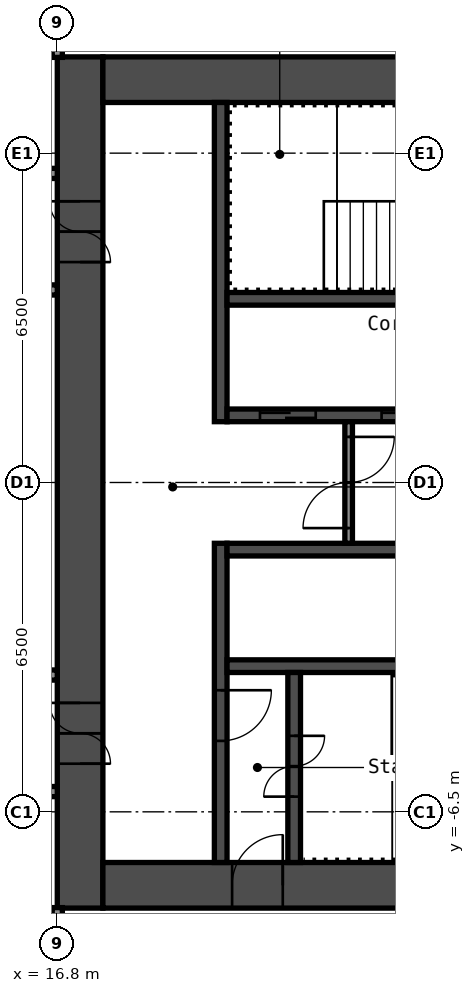
"""IFC4 building model, lengths in metres.
Left out: names, types, materials, properties, quantities, classifications, styles, units other than length and angle.
Written with IfcOpenShell. Run it as: python <this file> out.ifc"""

import sys

from ifc_helpers import new_model, si_unit, direction, frame, frame_2d, origin, place, context, subcontext, project, spatial, rectangle, extrude, element, fill, save


model = new_model("IFC4")
c1 = context("Model", 3, precision=1e-05, world=origin(), true_north=direction((0.0, 1.0)))
c2 = subcontext(c1, "Body", "Model", "MODEL_VIEW")
j1 = project(units=[si_unit("LENGTHUNIT", "METRE"), si_unit("PLANEANGLEUNIT", "RADIAN")], contexts=[c1])
p1 = place(None, origin())
s1 = spatial("IfcSite", under=j1, at=p1, CompositionType="ELEMENT")
p2 = place(p1, origin())
s2 = spatial("IfcBuilding", under=s1, at=p2, CompositionType="ELEMENT")
p3 = place(p2, frame((0.0, 0.0, 61.4)))
s3 = spatial("IfcBuildingStorey", under=s2, at=p3, CompositionType="ELEMENT", Elevation=61.4)
p4 = place(p3, frame((17.25, -8.4, 0.0), z_axis=(0.0, 0.0, 1.0), x_axis=(0.0, 1.0, 0.0)))
e1 = element("IfcWall", 1, at=p4, inside=s3, PredefinedType="SHEAR", context=c2, shape_type="SweptSolid", body=[
    extrude(rectangle(XDim=16.8, YDim=0.9, at=frame_2d((8.4, 0.0))), origin(), (0.0, 0.0, 1.0), 2.9),
])
p5 = place(p4, frame((12.75, 0.0, 0.0)))
e2 = element("IfcOpeningElement", 2, at=p5, cuts=e1, PredefinedType="OPENING", context=c2, shape_type="SweptSolid", body=[
    extrude(rectangle(XDim=1.2, YDim=2.1, at=frame_2d((0.6, 1.05))), frame((0.0, 0.46, 0.0), z_axis=(0.0, -1.0, 0.0), x_axis=(1.0, 0.0, 0.0)), (0.0, 0.0, 1.0), 0.92),
])
p6 = place(p4, frame((2.85, 0.0, 0.0)))
e3 = element("IfcOpeningElement", 3, at=p6, cuts=e1, PredefinedType="OPENING", context=c2, shape_type="SweptSolid", body=[
    extrude(rectangle(XDim=1.2, YDim=2.1, at=frame_2d((0.6, 1.05))), frame((0.0, 0.46, 0.0), z_axis=(0.0, -1.0, 0.0), x_axis=(1.0, 0.0, 0.0)), (0.0, 0.0, 1.0), 0.92),
])
p7 = place(p3, frame((17.7, 7.95, 0.0), z_axis=(0.0, 0.0, 1.0), x_axis=(1.0, 0.0, 0.0)))
e4 = element("IfcWall", 4, at=p7, inside=s3, PredefinedType="SHEAR", context=c2, shape_type="SweptSolid", body=[
    extrude(rectangle(XDim=15.0, YDim=0.9, at=frame_2d((7.5, 0.0))), origin(), (0.0, 0.0, 1.0), 2.9),
])
p8 = place(p7, frame((10.4, 0.0, 0.0)))
e5 = element("IfcOpeningElement", 5, at=p8, cuts=e4, PredefinedType="OPENING", context=c2, shape_type="SweptSolid", body=[
    extrude(rectangle(XDim=1.2, YDim=2.1, at=frame_2d((0.6, 1.05))), frame((0.0, 0.46, 0.0), z_axis=(0.0, -1.0, 0.0), x_axis=(1.0, 0.0, 0.0)), (0.0, 0.0, 1.0), 0.92),
])
p9 = place(p7, frame((13.35, 0.0, 0.0)))
e6 = element("IfcOpeningElement", 6, at=p9, cuts=e4, PredefinedType="OPENING", context=c2, shape_type="SweptSolid", body=[
    extrude(rectangle(XDim=0.9, YDim=2.1, at=frame_2d((0.45, 1.05))), frame((0.0, 0.46, 0.0), z_axis=(0.0, -1.0, 0.0), x_axis=(1.0, 0.0, 0.0)), (0.0, 0.0, 1.0), 0.92),
])
p10 = place(p3, frame((17.7, -7.95, 0.0), z_axis=(0.0, 0.0, 1.0), x_axis=(1.0, 0.0, 0.0)))
e7 = element("IfcWall", 7, at=p10, inside=s3, PredefinedType="SHEAR", context=c2, shape_type="SweptSolid", body=[
    extrude(rectangle(XDim=15.0, YDim=0.9, at=frame_2d((7.5, 0.0))), origin(), (0.0, 0.0, 1.0), 2.9),
])
p11 = place(p10, frame((2.55, 0.0, 0.0)))
e8 = element("IfcOpeningElement", 8, at=p11, cuts=e7, PredefinedType="OPENING", context=c2, shape_type="SweptSolid", body=[
    extrude(rectangle(XDim=1.0, YDim=2.1, at=frame_2d((0.5, 1.05))), frame((0.0, 0.46, 0.0), z_axis=(0.0, -1.0, 0.0), x_axis=(1.0, 0.0, 0.0)), (0.0, 0.0, 1.0), 0.92),
])
p12 = place(p3, frame((20.025, 1.2, 0.0), z_axis=(0.0, 0.0, 1.0), x_axis=(0.0, 1.0, 0.0)))
e9 = element("IfcWall", 9, at=p12, inside=s3, PredefinedType="SHEAR", context=c2, shape_type="SweptSolid", body=[
    extrude(rectangle(XDim=6.3, YDim=0.25, at=frame_2d((3.15, 0.0))), origin(), (0.0, 0.0, 1.0), 2.9),
])
p13 = place(p3, frame((20.025, -7.5, 0.0), z_axis=(0.0, 0.0, 1.0), x_axis=(0.0, 1.0, 0.0)))
e10 = element("IfcWall", 10, at=p13, inside=s3, PredefinedType="SHEAR", context=c2, shape_type="SweptSolid", body=[
    extrude(rectangle(XDim=6.3, YDim=0.25, at=frame_2d((3.15, 0.0))), origin(), (0.0, 0.0, 1.0), 2.9),
])
p14 = place(p13, frame((2.4, 0.0, 0.0)))
e11 = element("IfcOpeningElement", 11, at=p14, cuts=e10, PredefinedType="OPENING", context=c2, shape_type="SweptSolid", body=[
    extrude(rectangle(XDim=1.0, YDim=2.1, at=frame_2d((0.5, 1.05))), frame((0.0, 0.135, 0.0), z_axis=(0.0, -1.0, 0.0), x_axis=(1.0, 0.0, 0.0)), (0.0, 0.0, 1.0), 0.27),
])
p15 = place(p3, frame((20.15, 1.325, 0.0), z_axis=(0.0, 0.0, 1.0), x_axis=(1.0, 0.0, 0.0)))
e12 = element("IfcWall", 12, at=p15, inside=s3, PredefinedType="SHEAR", context=c2, shape_type="SweptSolid", body=[
    extrude(rectangle(XDim=7.5, YDim=0.25, at=frame_2d((3.75, 0.0))), origin(), (0.0, 0.0, 1.0), 2.9),
])
p16 = place(p15, frame((0.65, 0.0, 0.0)))
e13 = element("IfcOpeningElement", 13, at=p16, cuts=e12, PredefinedType="OPENING", context=c2, shape_type="SweptSolid", body=[
    extrude(rectangle(XDim=1.1, YDim=2.1, at=frame_2d((0.55, 1.05))), frame((0.0, 0.135, 0.0), z_axis=(0.0, -1.0, 0.0), x_axis=(1.0, 0.0, 0.0)), (0.0, 0.0, 1.0), 0.27),
])
p17 = place(p15, frame((3.05, 0.0, 0.0)))
e14 = element("IfcOpeningElement", 14, at=p17, cuts=e12, PredefinedType="OPENING", context=c2, shape_type="SweptSolid", body=[
    extrude(rectangle(XDim=1.1, YDim=2.1, at=frame_2d((0.55, 1.05))), frame((0.0, 0.135, 0.0), z_axis=(0.0, -1.0, 0.0), x_axis=(1.0, 0.0, 0.0)), (0.0, 0.0, 1.0), 0.27),
])
p18 = place(p15, frame((5.45, 0.0, 0.0)))
e15 = element("IfcOpeningElement", 15, at=p18, cuts=e12, PredefinedType="OPENING", context=c2, shape_type="SweptSolid", body=[
    extrude(rectangle(XDim=1.1, YDim=2.1, at=frame_2d((0.55, 1.05))), frame((0.0, 0.135, 0.0), z_axis=(0.0, -1.0, 0.0), x_axis=(1.0, 0.0, 0.0)), (0.0, 0.0, 1.0), 0.27),
])
for number, where, z_axis, x_axis in (
    (16, (20.15, 3.625, 0.0), (0.0, 0.0, 1.0), (1.0, 0.0, 0.0)),
    (17, (20.15, -1.325, 0.0), (0.0, 0.0, 1.0), (1.0, 0.0, 0.0)),
    (18, (20.15, -3.625, 0.0), (0.0, 0.0, 1.0), (1.0, 0.0, 0.0)),
):
    element("IfcWall", number, at=place(p3, frame(where, z_axis=z_axis, x_axis=x_axis)), inside=s3, PredefinedType="SHEAR", context=c2, shape_type="SweptSolid", body=[
        extrude(rectangle(XDim=7.5, YDim=0.25, at=frame_2d((3.75, 0.0))), origin(), (0.0, 0.0, 1.0), 2.9),
    ])
p19 = place(p3, frame((21.475, -7.5, 0.0), z_axis=(0.0, 0.0, 1.0), x_axis=(0.0, 1.0, 0.0)))
e19 = element("IfcWall", 19, at=p19, inside=s3, PredefinedType="SHEAR", context=c2, shape_type="SweptSolid", body=[
    extrude(rectangle(XDim=3.75, YDim=0.25, at=frame_2d((1.875, 0.0))), origin(), (0.0, 0.0, 1.0), 2.9),
])
p20 = place(p19, frame((1.3, 0.0, 0.0)))
e20 = element("IfcOpeningElement", 20, at=p20, cuts=e19, PredefinedType="OPENING", context=c2, shape_type="SweptSolid", body=[
    extrude(rectangle(XDim=1.2, YDim=2.1, at=frame_2d((0.6, 1.05))), frame((0.0, 0.135, 0.0), z_axis=(0.0, -1.0, 0.0), x_axis=(1.0, 0.0, 0.0)), (0.0, 0.0, 1.0), 0.27),
])
p21 = place(p3, frame((22.55, -1.2, 0.0), z_axis=(0.0, 0.0, 1.0), x_axis=(0.0, 1.0, 0.0)))
e21 = element("IfcWall", 21, at=p21, inside=s3, PredefinedType="PARTITIONING", context=c2, shape_type="SweptSolid", body=[
    extrude(rectangle(XDim=2.4, YDim=0.15, at=frame_2d((1.2, 0.0))), origin(), (0.0, 0.0, 1.0), 2.9),
])
p22 = place(p21, frame((0.3, 0.0, 0.0)))
e22 = element("IfcOpeningElement", 22, at=p22, cuts=e21, PredefinedType="OPENING", context=c2, shape_type="SweptSolid", body=[
    extrude(rectangle(XDim=1.8, YDim=2.1, at=frame_2d((0.9, 1.05))), frame((0.0, 0.085, 0.0), z_axis=(0.0, -1.0, 0.0), x_axis=(1.0, 0.0, 0.0)), (0.0, 0.0, 1.0), 0.17),
])
p23 = place(p3, frame((-16.8, -6.1, 0.0), z_axis=(0.0, 0.0, 1.0), x_axis=(1.0, 0.0, 0.0)))
e23 = element("IfcWall", 23, at=p23, inside=s3, PredefinedType="PARTITIONING", context=c2, shape_type="SweptSolid", body=[
    extrude(rectangle(XDim=33.6, YDim=0.2, at=frame_2d((16.8, 0.0))), origin(), (0.0, 0.0, 1.0), 2.9),
])
p24 = place(p23, frame((2.85, 0.0, 0.0)))
e24 = element("IfcOpeningElement", 24, at=p24, cuts=e23, PredefinedType="OPENING", context=c2, shape_type="SweptSolid", body=[
    extrude(rectangle(XDim=1.0, YDim=2.1, at=frame_2d((0.5, 1.05))), frame((0.0, 0.11, 0.0), z_axis=(0.0, -1.0, 0.0), x_axis=(1.0, 0.0, 0.0)), (0.0, 0.0, 1.0), 0.22),
])
p25 = place(p23, frame((4.55, 0.0, 0.0)))
e25 = element("IfcOpeningElement", 25, at=p25, cuts=e23, PredefinedType="OPENING", context=c2, shape_type="SweptSolid", body=[
    extrude(rectangle(XDim=1.0, YDim=2.1, at=frame_2d((0.5, 1.05))), frame((0.0, 0.11, 0.0), z_axis=(0.0, -1.0, 0.0), x_axis=(1.0, 0.0, 0.0)), (0.0, 0.0, 1.0), 0.22),
])
p26 = place(p23, frame((12.1, 0.0, 0.0)))
e26 = element("IfcOpeningElement", 26, at=p26, cuts=e23, PredefinedType="OPENING", context=c2, shape_type="SweptSolid", body=[
    extrude(rectangle(XDim=1.0, YDim=2.1, at=frame_2d((0.5, 1.05))), frame((0.0, 0.11, 0.0), z_axis=(0.0, -1.0, 0.0), x_axis=(1.0, 0.0, 0.0)), (0.0, 0.0, 1.0), 0.22),
])
p27 = place(p23, frame((19.65, 0.0, 0.0)))
e27 = element("IfcOpeningElement", 27, at=p27, cuts=e23, PredefinedType="OPENING", context=c2, shape_type="SweptSolid", body=[
    extrude(rectangle(XDim=1.0, YDim=2.1, at=frame_2d((0.5, 1.05))), frame((0.0, 0.11, 0.0), z_axis=(0.0, -1.0, 0.0), x_axis=(1.0, 0.0, 0.0)), (0.0, 0.0, 1.0), 0.22),
])
p28 = place(p23, frame((21.35, 0.0, 0.0)))
e28 = element("IfcOpeningElement", 28, at=p28, cuts=e23, PredefinedType="OPENING", context=c2, shape_type="SweptSolid", body=[
    extrude(rectangle(XDim=1.0, YDim=2.1, at=frame_2d((0.5, 1.05))), frame((0.0, 0.11, 0.0), z_axis=(0.0, -1.0, 0.0), x_axis=(1.0, 0.0, 0.0)), (0.0, 0.0, 1.0), 0.22),
])
p29 = place(p23, frame((30.6, 0.0, 0.0)))
e29 = element("IfcOpeningElement", 29, at=p29, cuts=e23, PredefinedType="OPENING", context=c2, shape_type="SweptSolid", body=[
    extrude(rectangle(XDim=1.0, YDim=2.1, at=frame_2d((0.5, 1.05))), frame((0.0, 0.11, 0.0), z_axis=(0.0, -1.0, 0.0), x_axis=(1.0, 0.0, 0.0)), (0.0, 0.0, 1.0), 0.22),
])
p30 = place(p3, frame((-16.8, -3.8, 0.0), z_axis=(0.0, 0.0, 1.0), x_axis=(1.0, 0.0, 0.0)))
e30 = element("IfcWall", 30, at=p30, inside=s3, PredefinedType="PARTITIONING", context=c2, shape_type="SweptSolid", body=[
    extrude(rectangle(XDim=33.6, YDim=0.2, at=frame_2d((16.8, 0.0))), origin(), (0.0, 0.0, 1.0), 2.9),
])
p31 = place(p30, frame((9.545, 0.0, 0.0)))
e31 = element("IfcOpeningElement", 31, at=p31, cuts=e30, PredefinedType="OPENING", context=c2, shape_type="SweptSolid", body=[
    extrude(rectangle(XDim=0.9, YDim=2.1, at=frame_2d((0.45, 1.05))), frame((0.0, 0.11, 0.0), z_axis=(0.0, -1.0, 0.0), x_axis=(1.0, 0.0, 0.0)), (0.0, 0.0, 1.0), 0.22),
])
p32 = place(p30, frame((13.745, 0.0, 0.0)))
e32 = element("IfcOpeningElement", 32, at=p32, cuts=e30, PredefinedType="OPENING", context=c2, shape_type="SweptSolid", body=[
    extrude(rectangle(XDim=0.9, YDim=2.1, at=frame_2d((0.45, 1.05))), frame((0.0, 0.11, 0.0), z_axis=(0.0, -1.0, 0.0), x_axis=(1.0, 0.0, 0.0)), (0.0, 0.0, 1.0), 0.22),
])
p33 = place(p30, frame((27.1, 0.0, 0.0)))
e33 = element("IfcOpeningElement", 33, at=p33, cuts=e30, PredefinedType="OPENING", context=c2, shape_type="SweptSolid", body=[
    extrude(rectangle(XDim=0.9, YDim=2.1, at=frame_2d((0.45, 1.05))), frame((0.0, 0.11, 0.0), z_axis=(0.0, -1.0, 0.0), x_axis=(1.0, 0.0, 0.0)), (0.0, 0.0, 1.0), 0.22),
])
p34 = place(p30, frame((31.3, 0.0, 0.0)))
e34 = element("IfcOpeningElement", 34, at=p34, cuts=e30, PredefinedType="OPENING", context=c2, shape_type="SweptSolid", body=[
    extrude(rectangle(XDim=0.9, YDim=2.1, at=frame_2d((0.45, 1.05))), frame((0.0, 0.11, 0.0), z_axis=(0.0, -1.0, 0.0), x_axis=(1.0, 0.0, 0.0)), (0.0, 0.0, 1.0), 0.22),
])
p35 = place(p3, frame((-16.8, 3.8, 0.0), z_axis=(0.0, 0.0, 1.0), x_axis=(1.0, 0.0, 0.0)))
e35 = element("IfcWall", 35, at=p35, inside=s3, PredefinedType="PARTITIONING", context=c2, shape_type="SweptSolid", body=[
    extrude(rectangle(XDim=33.6, YDim=0.2, at=frame_2d((16.8, 0.0))), origin(), (0.0, 0.0, 1.0), 2.9),
])
p36 = place(p35, frame((1.315, 0.0, 0.0)))
e36 = element("IfcOpeningElement", 36, at=p36, cuts=e35, PredefinedType="OPENING", context=c2, shape_type="SweptSolid", body=[
    extrude(rectangle(XDim=0.9, YDim=2.1, at=frame_2d((0.45, 1.05))), frame((0.0, 0.11, 0.0), z_axis=(0.0, -1.0, 0.0), x_axis=(1.0, 0.0, 0.0)), (0.0, 0.0, 1.0), 0.22),
])
p37 = place(p35, frame((5.515, 0.0, 0.0)))
e37 = element("IfcOpeningElement", 37, at=p37, cuts=e35, PredefinedType="OPENING", context=c2, shape_type="SweptSolid", body=[
    extrude(rectangle(XDim=0.9, YDim=2.1, at=frame_2d((0.45, 1.05))), frame((0.0, 0.11, 0.0), z_axis=(0.0, -1.0, 0.0), x_axis=(1.0, 0.0, 0.0)), (0.0, 0.0, 1.0), 0.22),
])
p38 = place(p35, frame((18.03, 0.0, 0.0)))
e38 = element("IfcOpeningElement", 38, at=p38, cuts=e35, PredefinedType="OPENING", context=c2, shape_type="SweptSolid", body=[
    extrude(rectangle(XDim=0.9, YDim=2.1, at=frame_2d((0.45, 1.05))), frame((0.0, 0.11, 0.0), z_axis=(0.0, -1.0, 0.0), x_axis=(1.0, 0.0, 0.0)), (0.0, 0.0, 1.0), 0.22),
])
p39 = place(p35, frame((22.23, 0.0, 0.0)))
e39 = element("IfcOpeningElement", 39, at=p39, cuts=e35, PredefinedType="OPENING", context=c2, shape_type="SweptSolid", body=[
    extrude(rectangle(XDim=0.9, YDim=2.1, at=frame_2d((0.45, 1.05))), frame((0.0, 0.11, 0.0), z_axis=(0.0, -1.0, 0.0), x_axis=(1.0, 0.0, 0.0)), (0.0, 0.0, 1.0), 0.22),
])
p40 = place(p3, frame((-16.8, 6.1, 0.0), z_axis=(0.0, 0.0, 1.0), x_axis=(1.0, 0.0, 0.0)))
e40 = element("IfcWall", 40, at=p40, inside=s3, PredefinedType="PARTITIONING", context=c2, shape_type="SweptSolid", body=[
    extrude(rectangle(XDim=33.6, YDim=0.2, at=frame_2d((16.8, 0.0))), origin(), (0.0, 0.0, 1.0), 2.9),
])
p41 = place(p40, frame((2.85, 0.0, 0.0)))
e41 = element("IfcOpeningElement", 41, at=p41, cuts=e40, PredefinedType="OPENING", context=c2, shape_type="SweptSolid", body=[
    extrude(rectangle(XDim=1.0, YDim=2.1, at=frame_2d((0.5, 1.05))), frame((0.0, 0.11, 0.0), z_axis=(0.0, -1.0, 0.0), x_axis=(1.0, 0.0, 0.0)), (0.0, 0.0, 1.0), 0.22),
])
p42 = place(p40, frame((4.55, 0.0, 0.0)))
e42 = element("IfcOpeningElement", 42, at=p42, cuts=e40, PredefinedType="OPENING", context=c2, shape_type="SweptSolid", body=[
    extrude(rectangle(XDim=1.0, YDim=2.1, at=frame_2d((0.5, 1.05))), frame((0.0, 0.11, 0.0), z_axis=(0.0, -1.0, 0.0), x_axis=(1.0, 0.0, 0.0)), (0.0, 0.0, 1.0), 0.22),
])
p43 = place(p40, frame((10.4, 0.0, 0.0)))
e43 = element("IfcOpeningElement", 43, at=p43, cuts=e40, PredefinedType="OPENING", context=c2, shape_type="SweptSolid", body=[
    extrude(rectangle(XDim=1.0, YDim=2.1, at=frame_2d((0.5, 1.05))), frame((0.0, 0.11, 0.0), z_axis=(0.0, -1.0, 0.0), x_axis=(1.0, 0.0, 0.0)), (0.0, 0.0, 1.0), 0.22),
])
p44 = place(p40, frame((22.3, 0.0, 0.0)))
e44 = element("IfcOpeningElement", 44, at=p44, cuts=e40, PredefinedType="OPENING", context=c2, shape_type="SweptSolid", body=[
    extrude(rectangle(XDim=1.0, YDim=2.1, at=frame_2d((0.5, 1.05))), frame((0.0, 0.11, 0.0), z_axis=(0.0, -1.0, 0.0), x_axis=(1.0, 0.0, 0.0)), (0.0, 0.0, 1.0), 0.22),
])
p45 = place(p40, frame((30.6, 0.0, 0.0)))
e45 = element("IfcOpeningElement", 45, at=p45, cuts=e40, PredefinedType="OPENING", context=c2, shape_type="SweptSolid", body=[
    extrude(rectangle(XDim=1.0, YDim=2.1, at=frame_2d((0.5, 1.05))), frame((0.0, 0.11, 0.0), z_axis=(0.0, -1.0, 0.0), x_axis=(1.0, 0.0, 0.0)), (0.0, 0.0, 1.0), 0.22),
])
for number, where, z_axis, x_axis in (
    (46, (16.8, -20.3, 0.0), (0.0, 0.0, 1.0), (0.0, 1.0, 0.0)),
    (47, (16.8, 8.39, 0.0), (0.0, 0.0, 1.0), (0.0, 1.0, 0.0)),
):
    element("IfcWall", number, at=place(p3, frame(where, z_axis=z_axis, x_axis=x_axis)), inside=s3, PredefinedType="PARTITIONING", context=c2, shape_type="SweptSolid", body=[
        extrude(rectangle(XDim=11.91, YDim=0.2, at=frame_2d((5.955, 0.0))), origin(), (0.0, 0.0, 1.0), 2.9),
    ])
p46 = place(p5, origin())
e48 = element("IfcDoor", 48, at=p46, inside=s3, OperationType="DOUBLE_DOOR_SINGLE_SWING", PredefinedType="DOOR", context=c2, shape_type="SweptSolid", body=[
    extrude(rectangle(XDim=1.2, YDim=2.1, at=frame_2d((0.6, 1.05))), frame((0.0, 0.025, 0.0), z_axis=(0.0, -1.0, 0.0), x_axis=(1.0, 0.0, 0.0)), (0.0, 0.0, 1.0), 0.05),
])
fill(e2, e48)
p47 = place(p6, origin())
e49 = element("IfcDoor", 49, at=p47, inside=s3, OperationType="DOUBLE_DOOR_SINGLE_SWING", PredefinedType="DOOR", context=c2, shape_type="SweptSolid", body=[
    extrude(rectangle(XDim=1.2, YDim=2.1, at=frame_2d((0.6, 1.05))), frame((0.0, 0.025, 0.0), z_axis=(0.0, -1.0, 0.0), x_axis=(1.0, 0.0, 0.0)), (0.0, 0.0, 1.0), 0.05),
])
fill(e3, e49)
p48 = place(p11, origin())
e50 = element("IfcDoor", 50, at=p48, inside=s3, OperationType="SINGLE_SWING_LEFT", PredefinedType="DOOR", context=c2, shape_type="SweptSolid", body=[
    extrude(rectangle(XDim=1.0, YDim=2.1, at=frame_2d((0.5, 1.05))), frame((0.0, 0.025, 0.0), z_axis=(0.0, -1.0, 0.0), x_axis=(1.0, 0.0, 0.0)), (0.0, 0.0, 1.0), 0.05),
])
fill(e8, e50)
p49 = place(p20, origin())
e51 = element("IfcDoor", 51, at=p49, inside=s3, OperationType="DOUBLE_DOOR_SINGLE_SWING", PredefinedType="DOOR", context=c2, shape_type="SweptSolid", body=[
    extrude(rectangle(XDim=1.2, YDim=2.1, at=frame_2d((0.6, 1.05))), frame((0.0, 0.025, 0.0), z_axis=(0.0, -1.0, 0.0), x_axis=(1.0, 0.0, 0.0)), (0.0, 0.0, 1.0), 0.05),
])
fill(e20, e51)
p50 = place(p14, origin())
e52 = element("IfcDoor", 52, at=p50, inside=s3, OperationType="SINGLE_SWING_RIGHT", PredefinedType="DOOR", context=c2, shape_type="SweptSolid", body=[
    extrude(rectangle(XDim=1.0, YDim=2.1, at=frame_2d((0.5, 1.05))), frame((0.0, 0.025, 0.0), z_axis=(0.0, -1.0, 0.0), x_axis=(1.0, 0.0, 0.0)), (0.0, 0.0, 1.0), 0.05),
])
fill(e11, e52)
p51 = place(p22, origin())
e53 = element("IfcDoor", 53, at=p51, inside=s3, OperationType="DOUBLE_DOOR_SINGLE_SWING", PredefinedType="DOOR", context=c2, shape_type="SweptSolid", body=[
    extrude(rectangle(XDim=1.8, YDim=2.1, at=frame_2d((0.9, 1.05))), frame((0.0, 0.025, 0.0), z_axis=(0.0, -1.0, 0.0), x_axis=(1.0, 0.0, 0.0)), (0.0, 0.0, 1.0), 0.05),
])
fill(e22, e53)
p52 = place(p16, origin())
e54 = element("IfcDoor", 54, at=p52, inside=s3, OperationType="DOUBLE_DOOR_SLIDING", PredefinedType="DOOR", context=c2, shape_type="SweptSolid", body=[
    extrude(rectangle(XDim=1.1, YDim=2.1, at=frame_2d((0.55, 1.05))), frame((0.0, 0.025, 0.0), z_axis=(0.0, -1.0, 0.0), x_axis=(1.0, 0.0, 0.0)), (0.0, 0.0, 1.0), 0.05),
])
fill(e13, e54)
p53 = place(p17, origin())
e55 = element("IfcDoor", 55, at=p53, inside=s3, OperationType="DOUBLE_DOOR_SLIDING", PredefinedType="DOOR", context=c2, shape_type="SweptSolid", body=[
    extrude(rectangle(XDim=1.1, YDim=2.1, at=frame_2d((0.55, 1.05))), frame((0.0, 0.025, 0.0), z_axis=(0.0, -1.0, 0.0), x_axis=(1.0, 0.0, 0.0)), (0.0, 0.0, 1.0), 0.05),
])
fill(e14, e55)
save(model, sys.argv[1])
